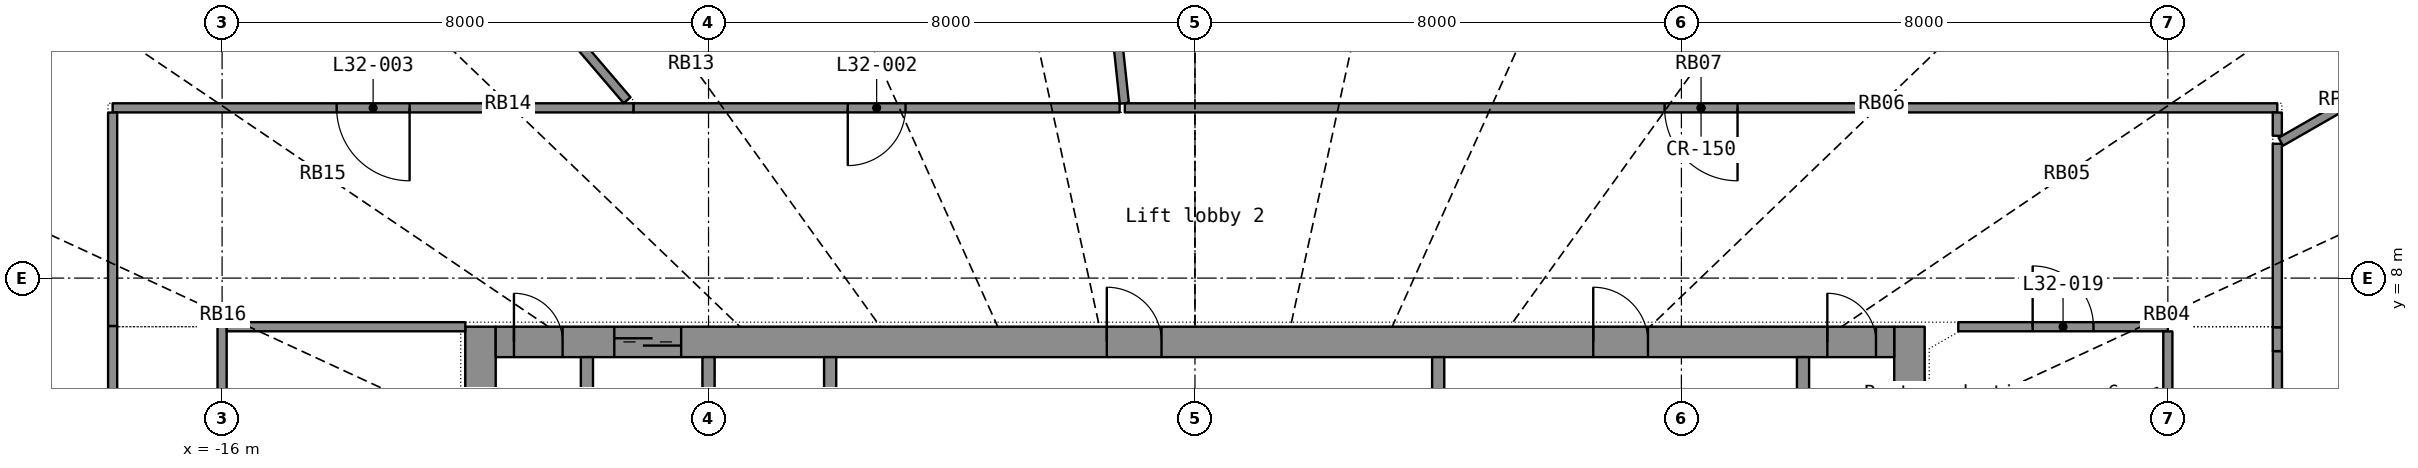
"""IFC4 building model, lengths in metres.
Left out: names, types, materials, properties, quantities, classifications, styles, units other than length and angle.
Written with IfcOpenShell. Run it as: python <this file> out.ifc"""

import sys

from ifc_helpers import new_model, si_unit, direction, frame, frame_2d, origin, place, context, subcontext, project, spatial, rectangle, extrude, element, fill, save


model = new_model("IFC4")
c1 = context("Model", 3, precision=1e-05, world=origin(), true_north=direction((0.0, 1.0)))
c2 = subcontext(c1, "Body", "Model", "MODEL_VIEW")
j1 = project(units=[si_unit("LENGTHUNIT", "METRE"), si_unit("PLANEANGLEUNIT", "RADIAN")], contexts=[c1])
p1 = place(None, origin())
s1 = spatial("IfcSite", under=j1, at=p1, CompositionType="ELEMENT")
p2 = place(p1, origin())
s2 = spatial("IfcBuilding", under=s1, at=p2, CompositionType="ELEMENT")
p3 = place(p2, frame((0.0, 0.0, 134.1)))
s3 = spatial("IfcBuildingStorey", under=s2, at=p3, CompositionType="ELEMENT", Elevation=134.1)
p4 = place(p3, frame((-11.75, -7.2, 0.0), z_axis=(0.0, 0.0, 1.0), x_axis=(0.0, 1.0, 0.0)))
e1 = element("IfcWall", 1, at=p4, inside=s3, PredefinedType="SHEAR", context=c2, shape_type="SweptSolid", body=[
    extrude(rectangle(XDim=14.4, YDim=0.5, at=frame_2d((7.2, 0.0))), origin(), (0.0, 0.0, 1.0), 3.3),
])
p5 = place(p4, frame((6.5, 0.0, 0.0)))
e2 = element("IfcOpeningElement", 2, at=p5, cuts=e1, PredefinedType="OPENING", context=c2, shape_type="SweptSolid", body=[
    extrude(rectangle(XDim=1.4, YDim=2.2, at=frame_2d((0.7, 1.1))), frame((0.0, 0.26, 0.0), z_axis=(0.0, -1.0, 0.0), x_axis=(1.0, 0.0, 0.0)), (0.0, 0.0, 1.0), 0.52),
])
p6 = place(p3, frame((11.75, -7.2, 0.0), z_axis=(0.0, 0.0, 1.0), x_axis=(0.0, 1.0, 0.0)))
e3 = element("IfcWall", 3, at=p6, inside=s3, PredefinedType="SHEAR", context=c2, shape_type="SweptSolid", body=[
    extrude(rectangle(XDim=14.4, YDim=0.5, at=frame_2d((7.2, 0.0))), origin(), (0.0, 0.0, 1.0), 3.3),
])
p7 = place(p6, frame((6.5, 0.0, 0.0)))
e4 = element("IfcOpeningElement", 4, at=p7, cuts=e3, PredefinedType="OPENING", context=c2, shape_type="SweptSolid", body=[
    extrude(rectangle(XDim=1.4, YDim=2.2, at=frame_2d((0.7, 1.1))), frame((0.0, 0.26, 0.0), z_axis=(0.0, -1.0, 0.0), x_axis=(1.0, 0.0, 0.0)), (0.0, 0.0, 1.0), 0.52),
])
p8 = place(p3, frame((-11.5, 6.95, 0.0), z_axis=(0.0, 0.0, 1.0), x_axis=(1.0, 0.0, 0.0)))
e5 = element("IfcWall", 5, at=p8, inside=s3, PredefinedType="SHEAR", context=c2, shape_type="SweptSolid", body=[
    extrude(rectangle(XDim=23.0, YDim=0.5, at=frame_2d((11.5, 0.0))), origin(), (0.0, 0.0, 1.0), 3.3),
])
p9 = place(p8, frame((1.95, 0.0, 0.0)))
e6 = element("IfcOpeningElement", 6, at=p9, cuts=e5, PredefinedType="OPENING", context=c2, shape_type="SweptSolid", body=[
    extrude(rectangle(XDim=1.1, YDim=2.2, at=frame_2d((0.55, 1.1))), frame((0.0, 0.26, 0.0), z_axis=(0.0, -1.0, 0.0), x_axis=(1.0, 0.0, 0.0)), (0.0, 0.0, 1.0), 0.52),
])
p10 = place(p8, frame((10.05, 0.0, 0.0)))
e7 = element("IfcOpeningElement", 7, at=p10, cuts=e5, PredefinedType="OPENING", context=c2, shape_type="SweptSolid", body=[
    extrude(rectangle(XDim=0.9, YDim=2.1, at=frame_2d((0.45, 1.05))), frame((0.0, 0.26, 0.0), z_axis=(0.0, -1.0, 0.0), x_axis=(1.0, 0.0, 0.0)), (0.0, 0.0, 1.0), 0.52),
])
p11 = place(p8, frame((18.05, 0.0, 0.0)))
e8 = element("IfcOpeningElement", 8, at=p11, cuts=e5, PredefinedType="OPENING", context=c2, shape_type="SweptSolid", body=[
    extrude(rectangle(XDim=0.9, YDim=2.1, at=frame_2d((0.45, 1.05))), frame((0.0, 0.26, 0.0), z_axis=(0.0, -1.0, 0.0), x_axis=(1.0, 0.0, 0.0)), (0.0, 0.0, 1.0), 0.52),
])
p12 = place(p8, frame((0.3, 0.0, 0.0)))
e9 = element("IfcOpeningElement", 9, at=p12, cuts=e5, PredefinedType="OPENING", context=c2, shape_type="SweptSolid", body=[
    extrude(rectangle(XDim=0.8, YDim=2.05, at=frame_2d((0.4, 1.025))), frame((0.0, 0.26, 0.0), z_axis=(0.0, -1.0, 0.0), x_axis=(1.0, 0.0, 0.0)), (0.0, 0.0, 1.0), 0.52),
])
p13 = place(p8, frame((21.9, 0.0, 0.0)))
e10 = element("IfcOpeningElement", 10, at=p13, cuts=e5, PredefinedType="OPENING", context=c2, shape_type="SweptSolid", body=[
    extrude(rectangle(XDim=0.8, YDim=2.05, at=frame_2d((0.4, 1.025))), frame((0.0, 0.26, 0.0), z_axis=(0.0, -1.0, 0.0), x_axis=(1.0, 0.0, 0.0)), (0.0, 0.0, 1.0), 0.52),
])
for number, where, z_axis, x_axis in (
    (11, (-10.0, 3.9, 0.0), (0.0, 0.0, 1.0), (0.0, 1.0, 0.0)),
    (12, (-8.0, 3.9, 0.0), (0.0, 0.0, 1.0), (0.0, 1.0, 0.0)),
    (13, (-6.0, 3.9, 0.0), (0.0, 0.0, 1.0), (0.0, 1.0, 0.0)),
    (14, (10.0, 3.9, 0.0), (0.0, 0.0, 1.0), (0.0, 1.0, 0.0)),
):
    element("IfcWall", number, at=place(p3, frame(where, z_axis=z_axis, x_axis=x_axis)), inside=s3, PredefinedType="SHEAR", context=c2, shape_type="SweptSolid", body=[
        extrude(rectangle(XDim=2.8, YDim=0.2, at=frame_2d((1.4, 0.0))), origin(), (0.0, 0.0, 1.0), 3.3),
    ])
p14 = place(p3, frame((4.0, 3.9, 0.0), z_axis=(0.0, 0.0, 1.0), x_axis=(0.0, 1.0, 0.0)))
e15 = element("IfcWall", 15, at=p14, inside=s3, PredefinedType="PARTITIONING", context=c2, shape_type="SweptSolid", body=[
    extrude(rectangle(XDim=2.8, YDim=0.2, at=frame_2d((1.4, 0.0))), origin(), (0.0, 0.0, 1.0), 3.3),
])
p15 = place(p3, frame((17.8, 10.8, 0.0), z_axis=(0.0, 0.0, 1.0), x_axis=(-1.0, 0.0, 0.0)))
e16 = element("IfcWall", 16, at=p15, inside=s3, PredefinedType="PARTITIONING", context=c2, shape_type="SweptSolid", body=[
    extrude(rectangle(XDim=18.954, YDim=0.15, at=frame_2d((9.477, 0.0))), origin(), (0.0, 0.0, 1.0), 2.4),
])
p16 = place(p15, frame((8.877, 0.0, 0.0)))
e17 = element("IfcOpeningElement", 17, at=p16, cuts=e16, PredefinedType="OPENING", context=c2, shape_type="SweptSolid", body=[
    extrude(rectangle(XDim=1.2, YDim=2.2, at=frame_2d((0.6, 1.1))), frame((0.0, 0.085, 0.0), z_axis=(0.0, -1.0, 0.0), x_axis=(1.0, 0.0, 0.0)), (0.0, 0.0, 1.0), 0.17),
])
p17 = place(p3, frame((17.802, -3.905, 0.0), z_axis=(0.0, 0.0, 1.0), x_axis=(0.0, 1.0, 0.0)))
e18 = element("IfcWall", 18, at=p17, inside=s3, PredefinedType="PARTITIONING", context=c2, shape_type="SweptSolid", body=[
    extrude(rectangle(XDim=10.705, YDim=0.15, at=frame_2d((5.353, 0.0))), origin(), (0.0, 0.0, 1.0), 2.4),
])
p18 = place(p17, frame((4.752, 0.0, 0.0)))
e19 = element("IfcOpeningElement", 19, at=p18, cuts=e18, PredefinedType="OPENING", context=c2, shape_type="SweptSolid", body=[
    extrude(rectangle(XDim=1.2, YDim=2.2, at=frame_2d((0.6, 1.1))), frame((0.0, 0.085, 0.0), z_axis=(0.0, -1.0, 0.0), x_axis=(1.0, 0.0, 0.0)), (0.0, 0.0, 1.0), 0.17),
])
p19 = place(p3, frame((-2.152, 20.148, 0.0), z_axis=(0.0, 0.0, 1.0), x_axis=(0.106226181, -0.994341993, 0.0)))
e20 = element("IfcWall", 20, at=p19, inside=s3, PredefinedType="PARTITIONING", context=c2, shape_type="SweptSolid", body=[
    extrude(rectangle(XDim=9.324, YDim=0.15, at=frame_2d((4.662, 0.0))), origin(), (0.0, 0.0, 1.0), 2.4),
])
p20 = place(p3, frame((-9.232, 10.8, 0.0), z_axis=(0.0, 0.0, 1.0), x_axis=(-1.0, 0.0, 0.0)))
e21 = element("IfcWall", 21, at=p20, inside=s3, PredefinedType="PARTITIONING", context=c2, shape_type="SweptSolid", body=[
    extrude(rectangle(XDim=8.568, YDim=0.15, at=frame_2d((4.284, 0.0))), origin(), (0.0, 0.0, 1.0), 2.4),
])
p21 = place(p20, frame((3.684, 0.0, 0.0)))
e22 = element("IfcOpeningElement", 22, at=p21, cuts=e21, PredefinedType="OPENING", context=c2, shape_type="SweptSolid", body=[
    extrude(rectangle(XDim=1.2, YDim=2.2, at=frame_2d((0.6, 1.1))), frame((0.0, 0.085, 0.0), z_axis=(0.0, -1.0, 0.0), x_axis=(1.0, 0.0, 0.0)), (0.0, 0.0, 1.0), 0.17),
])
p22 = place(p3, frame((-17.8, 7.212, 0.0), z_axis=(0.0, 0.0, 1.0), x_axis=(0.0, -1.0, 0.0)))
e23 = element("IfcWall", 23, at=p22, inside=s3, PredefinedType="PARTITIONING", context=c2, shape_type="SweptSolid", body=[
    extrude(rectangle(XDim=8.488, YDim=0.15, at=frame_2d((4.244, 0.0))), origin(), (0.0, 0.0, 1.0), 2.4),
])
p23 = place(p22, frame((3.644, 0.0, 0.0)))
e24 = element("IfcOpeningElement", 24, at=p23, cuts=e23, PredefinedType="OPENING", context=c2, shape_type="SweptSolid", body=[
    extrude(rectangle(XDim=1.2, YDim=2.2, at=frame_2d((0.6, 1.1))), frame((0.0, 0.085, 0.0), z_axis=(0.0, -1.0, 0.0), x_axis=(1.0, 0.0, 0.0)), (0.0, 0.0, 1.0), 0.17),
])
p24 = place(p3, frame((-1.239, 10.8, 0.0), z_axis=(0.0, 0.0, 1.0), x_axis=(-1.0, 0.0, 0.0)))
e25 = element("IfcWall", 25, at=p24, inside=s3, PredefinedType="PARTITIONING", context=c2, shape_type="SweptSolid", body=[
    extrude(rectangle(XDim=7.992, YDim=0.15, at=frame_2d((3.996, 0.0))), origin(), (0.0, 0.0, 1.0), 2.4),
])
p25 = place(p24, frame((3.521, 0.0, 0.0)))
e26 = element("IfcOpeningElement", 26, at=p25, cuts=e25, PredefinedType="OPENING", context=c2, shape_type="SweptSolid", body=[
    extrude(rectangle(XDim=0.95, YDim=2.15, at=frame_2d((0.475, 1.075))), frame((0.0, 0.085, 0.0), z_axis=(0.0, -1.0, 0.0), x_axis=(1.0, 0.0, 0.0)), (0.0, 0.0, 1.0), 0.17),
])
p26 = place(p3, frame((-14.167, 16.573, 0.0), z_axis=(0.0, 0.0, 1.0), x_axis=(0.64976247, -0.760137312, 0.0)))
e27 = element("IfcWall", 27, at=p26, inside=s3, PredefinedType="PARTITIONING", context=c2, shape_type="SweptSolid", body=[
    extrude(rectangle(XDim=7.43, YDim=0.15, at=frame_2d((3.715, 0.0))), origin(), (0.0, 0.0, 1.0), 2.4),
])
p27 = place(p3, frame((-16.0, 0.9, 0.0), z_axis=(0.0, 0.0, 1.0), x_axis=(0.0, 1.0, 0.0)))
e28 = element("IfcWall", 28, at=p27, inside=s3, PredefinedType="PARTITIONING", context=c2, shape_type="SweptSolid", body=[
    extrude(rectangle(XDim=6.3, YDim=0.15, at=frame_2d((3.15, 0.0))), origin(), (0.0, 0.0, 1.0), 2.4),
])
p28 = place(p27, frame((2.55, 0.0, 0.0)))
e29 = element("IfcOpeningElement", 29, at=p28, cuts=e28, PredefinedType="OPENING", context=c2, shape_type="SweptSolid", body=[
    extrude(rectangle(XDim=1.2, YDim=2.2, at=frame_2d((0.6, 1.1))), frame((0.0, 0.085, 0.0), z_axis=(0.0, -1.0, 0.0), x_axis=(1.0, 0.0, 0.0)), (0.0, 0.0, 1.0), 0.17),
])
p29 = place(p3, frame((-15.923, 7.2, 0.0), z_axis=(0.0, 0.0, 1.0), x_axis=(1.0, 0.0, 0.0)))
e30 = element("IfcWall", 30, at=p29, inside=s3, PredefinedType="PARTITIONING", context=c2, shape_type="SweptSolid", body=[
    extrude(rectangle(XDim=3.923, YDim=0.15, at=frame_2d((1.961, 0.0))), origin(), (0.0, 0.0, 1.0), 2.4),
])
p30 = place(p3, frame((-17.8, 10.723, 0.0), z_axis=(0.0, 0.0, 1.0), x_axis=(0.0, -1.0, 0.0)))
e31 = element("IfcWall", 31, at=p30, inside=s3, PredefinedType="PARTITIONING", context=c2, shape_type="SweptSolid", body=[
    extrude(rectangle(XDim=3.51, YDim=0.15, at=frame_2d((1.755, 0.0))), origin(), (0.0, 0.0, 1.0), 2.4),
])
p31 = place(p3, frame((12.553, 7.2, 0.0), z_axis=(0.0, 0.0, 1.0), x_axis=(1.0, 0.0, 0.0)))
e32 = element("IfcWall", 32, at=p31, inside=s3, PredefinedType="PARTITIONING", context=c2, shape_type="SweptSolid", body=[
    extrude(rectangle(XDim=3.447, YDim=0.15, at=frame_2d((1.723, 0.0))), origin(), (0.0, 0.0, 1.0), 2.4),
])
p32 = place(p31, frame((1.223, 0.0, 0.0)))
e33 = element("IfcOpeningElement", 33, at=p32, cuts=e32, PredefinedType="OPENING", context=c2, shape_type="SweptSolid", body=[
    extrude(rectangle(XDim=1.0, YDim=2.2, at=frame_2d((0.5, 1.1))), frame((0.0, 0.085, 0.0), z_axis=(0.0, -1.0, 0.0), x_axis=(1.0, 0.0, 0.0)), (0.0, 0.0, 1.0), 0.17),
])
p33 = place(p3, frame((17.8, 7.188, 0.0), z_axis=(0.0, 0.0, 1.0), x_axis=(0.0, 1.0, 0.0)))
e34 = element("IfcWall", 34, at=p33, inside=s3, PredefinedType="PARTITIONING", context=c2, shape_type="SweptSolid", body=[
    extrude(rectangle(XDim=3.021, YDim=0.15, at=frame_2d((1.511, 0.0))), origin(), (0.0, 0.0, 1.0), 2.4),
])
p34 = place(p3, frame((17.858, 10.243, 0.0), z_axis=(0.0, 0.0, 1.0), x_axis=(0.867454205, 0.497517037, 0.0)))
e35 = element("IfcWall", 35, at=p34, inside=s3, PredefinedType="PARTITIONING", context=c2, shape_type="SweptSolid", body=[
    extrude(rectangle(XDim=2.746, YDim=0.15, at=frame_2d((1.373, 0.0))), origin(), (0.0, 0.0, 1.0), 2.4),
])
p35 = place(p3, frame((16.0, 7.123, 0.0), z_axis=(0.0, 0.0, 1.0), x_axis=(0.0, -1.0, 0.0)))
e36 = element("IfcWall", 36, at=p35, inside=s3, PredefinedType="PARTITIONING", context=c2, shape_type="SweptSolid", body=[
    extrude(rectangle(XDim=1.011, YDim=0.15, at=frame_2d((0.505, 0.0))), origin(), (0.0, 0.0, 1.0), 2.4),
])
p36 = place(p3, frame((17.8, 10.341, 0.0), z_axis=(0.0, 0.0, 1.0), x_axis=(0.0, 1.0, 0.0)))
e37 = element("IfcWall", 37, at=p36, inside=s3, PredefinedType="PARTITIONING", context=c2, shape_type="SweptSolid", body=[
    extrude(rectangle(XDim=0.382, YDim=0.15, at=frame_2d((0.191, 0.0))), origin(), (0.0, 0.0, 1.0), 2.4),
])
p37 = place(p3, frame((17.8, 6.799, 0.0), z_axis=(0.0, 0.0, 1.0), x_axis=(0.0, 1.0, 0.0)))
e38 = element("IfcWall", 38, at=p37, inside=s3, PredefinedType="PARTITIONING", context=c2, shape_type="SweptSolid", body=[
    extrude(rectangle(XDim=0.388, YDim=0.15, at=frame_2d((0.194, 0.0))), origin(), (0.0, 0.0, 1.0), 2.4),
])
p38 = place(p9, origin())
e39 = element("IfcDoor", 39, at=p38, inside=s3, OperationType="DOUBLE_DOOR_SLIDING", PredefinedType="DOOR", context=c2, shape_type="SweptSolid", body=[
    extrude(rectangle(XDim=1.1, YDim=2.2, at=frame_2d((0.55, 1.1))), frame((0.0, 0.025, 0.0), z_axis=(0.0, -1.0, 0.0), x_axis=(1.0, 0.0, 0.0)), (0.0, 0.0, 1.0), 0.05),
])
fill(e6, e39)
p39 = place(p10, origin())
e40 = element("IfcDoor", 40, at=p39, inside=s3, OperationType="SINGLE_SWING_LEFT", PredefinedType="DOOR", context=c2, shape_type="SweptSolid", body=[
    extrude(rectangle(XDim=0.9, YDim=2.1, at=frame_2d((0.45, 1.05))), frame((0.0, 0.025, 0.0), z_axis=(0.0, -1.0, 0.0), x_axis=(1.0, 0.0, 0.0)), (0.0, 0.0, 1.0), 0.05),
])
fill(e7, e40)
p40 = place(p11, origin())
e41 = element("IfcDoor", 41, at=p40, inside=s3, OperationType="SINGLE_SWING_LEFT", PredefinedType="DOOR", context=c2, shape_type="SweptSolid", body=[
    extrude(rectangle(XDim=0.9, YDim=2.1, at=frame_2d((0.45, 1.05))), frame((0.0, 0.025, 0.0), z_axis=(0.0, -1.0, 0.0), x_axis=(1.0, 0.0, 0.0)), (0.0, 0.0, 1.0), 0.05),
])
fill(e8, e41)
p41 = place(p12, origin())
e42 = element("IfcDoor", 42, at=p41, inside=s3, OperationType="SINGLE_SWING_LEFT", PredefinedType="DOOR", context=c2, shape_type="SweptSolid", body=[
    extrude(rectangle(XDim=0.8, YDim=2.05, at=frame_2d((0.4, 1.025))), frame((0.0, 0.025, 0.0), z_axis=(0.0, -1.0, 0.0), x_axis=(1.0, 0.0, 0.0)), (0.0, 0.0, 1.0), 0.05),
])
fill(e9, e42)
p42 = place(p13, origin())
e43 = element("IfcDoor", 43, at=p42, inside=s3, OperationType="SINGLE_SWING_LEFT", PredefinedType="DOOR", context=c2, shape_type="SweptSolid", body=[
    extrude(rectangle(XDim=0.8, YDim=2.05, at=frame_2d((0.4, 1.025))), frame((0.0, 0.025, 0.0), z_axis=(0.0, -1.0, 0.0), x_axis=(1.0, 0.0, 0.0)), (0.0, 0.0, 1.0), 0.05),
])
fill(e10, e43)
p43 = place(p16, origin())
e44 = element("IfcDoor", 44, at=p43, inside=s3, OperationType="DOUBLE_DOOR_SINGLE_SWING", PredefinedType="DOOR", context=c2, shape_type="SweptSolid", body=[
    extrude(rectangle(XDim=1.2, YDim=2.2, at=frame_2d((0.6, 1.1))), frame((0.0, 0.025, 0.0), z_axis=(0.0, -1.0, 0.0), x_axis=(1.0, 0.0, 0.0)), (0.0, 0.0, 1.0), 0.05),
])
fill(e17, e44)
p44 = place(p25, origin())
e45 = element("IfcDoor", 45, at=p44, inside=s3, OperationType="SINGLE_SWING_RIGHT", PredefinedType="DOOR", context=c2, shape_type="SweptSolid", body=[
    extrude(rectangle(XDim=0.95, YDim=2.15, at=frame_2d((0.475, 1.075))), frame((0.0, 0.025, 0.0), z_axis=(0.0, -1.0, 0.0), x_axis=(1.0, 0.0, 0.0)), (0.0, 0.0, 1.0), 0.05),
])
fill(e26, e45)
p45 = place(p21, origin())
e46 = element("IfcDoor", 46, at=p45, inside=s3, OperationType="DOUBLE_DOOR_SINGLE_SWING", PredefinedType="DOOR", context=c2, shape_type="SweptSolid", body=[
    extrude(rectangle(XDim=1.2, YDim=2.2, at=frame_2d((0.6, 1.1))), frame((0.0, 0.025, 0.0), z_axis=(0.0, -1.0, 0.0), x_axis=(1.0, 0.0, 0.0)), (0.0, 0.0, 1.0), 0.05),
])
fill(e22, e46)
p46 = place(p32, origin())
e47 = element("IfcDoor", 47, at=p46, inside=s3, OperationType="SINGLE_SWING_LEFT", PredefinedType="DOOR", context=c2, shape_type="SweptSolid", body=[
    extrude(rectangle(XDim=1.0, YDim=2.2, at=frame_2d((0.5, 1.1))), frame((0.0, 0.025, 0.0), z_axis=(0.0, -1.0, 0.0), x_axis=(1.0, 0.0, 0.0)), (0.0, 0.0, 1.0), 0.05),
])
fill(e33, e47)
save(model, sys.argv[1])
